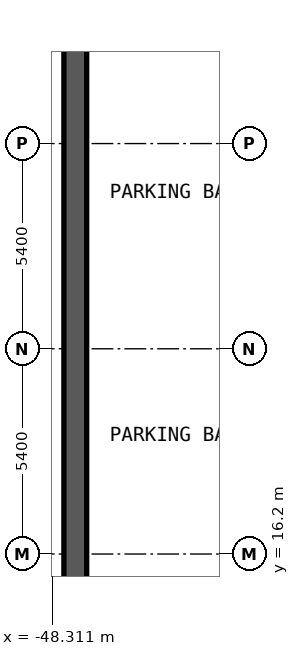
"""IFC4 building model, lengths in metres.
Left out: names, types, materials, properties, quantities, classifications, styles, units other than length and angle.
Written with IfcOpenShell. Run it as: python <this file> out.ifc"""

import sys

from ifc_helpers import new_model, si_unit, direction, frame, frame_2d, origin, place, context, subcontext, project, spatial, rectangle, extrude, element, save


model = new_model("IFC4")
c1 = context("Model", 3, precision=1e-05, world=origin(), true_north=direction((0.0, 1.0)))
c2 = subcontext(c1, "Body", "Model", "MODEL_VIEW")
j1 = project(units=[si_unit("LENGTHUNIT", "METRE"), si_unit("PLANEANGLEUNIT", "RADIAN")], contexts=[c1])
p1 = place(None, origin())
s1 = spatial("IfcSite", under=j1, at=p1, CompositionType="ELEMENT")
p2 = place(p1, origin())
s2 = spatial("IfcBuilding", under=s1, at=p2, CompositionType="ELEMENT")
p3 = place(p2, frame((0.0, 0.0, -8.4)))
s3 = spatial("IfcBuildingStorey", under=s2, at=p3, CompositionType="ELEMENT", Elevation=-8.4)
p4 = place(p3, frame((-47.7, -31.4, -0.35), z_axis=(0.0, 0.0, 1.0), x_axis=(0.0, 1.0, 0.0)))
e1 = element("IfcWall", 1, at=p4, inside=s3, PredefinedType="SOLIDWALL", context=c2, shape_type="SweptSolid", body=[
    extrude(rectangle(XDim=70.8, YDim=0.6, at=frame_2d((35.4, 0.0))), origin(), (0.0, 0.0, 1.0), 4.55),
])
save(model, sys.argv[1])
